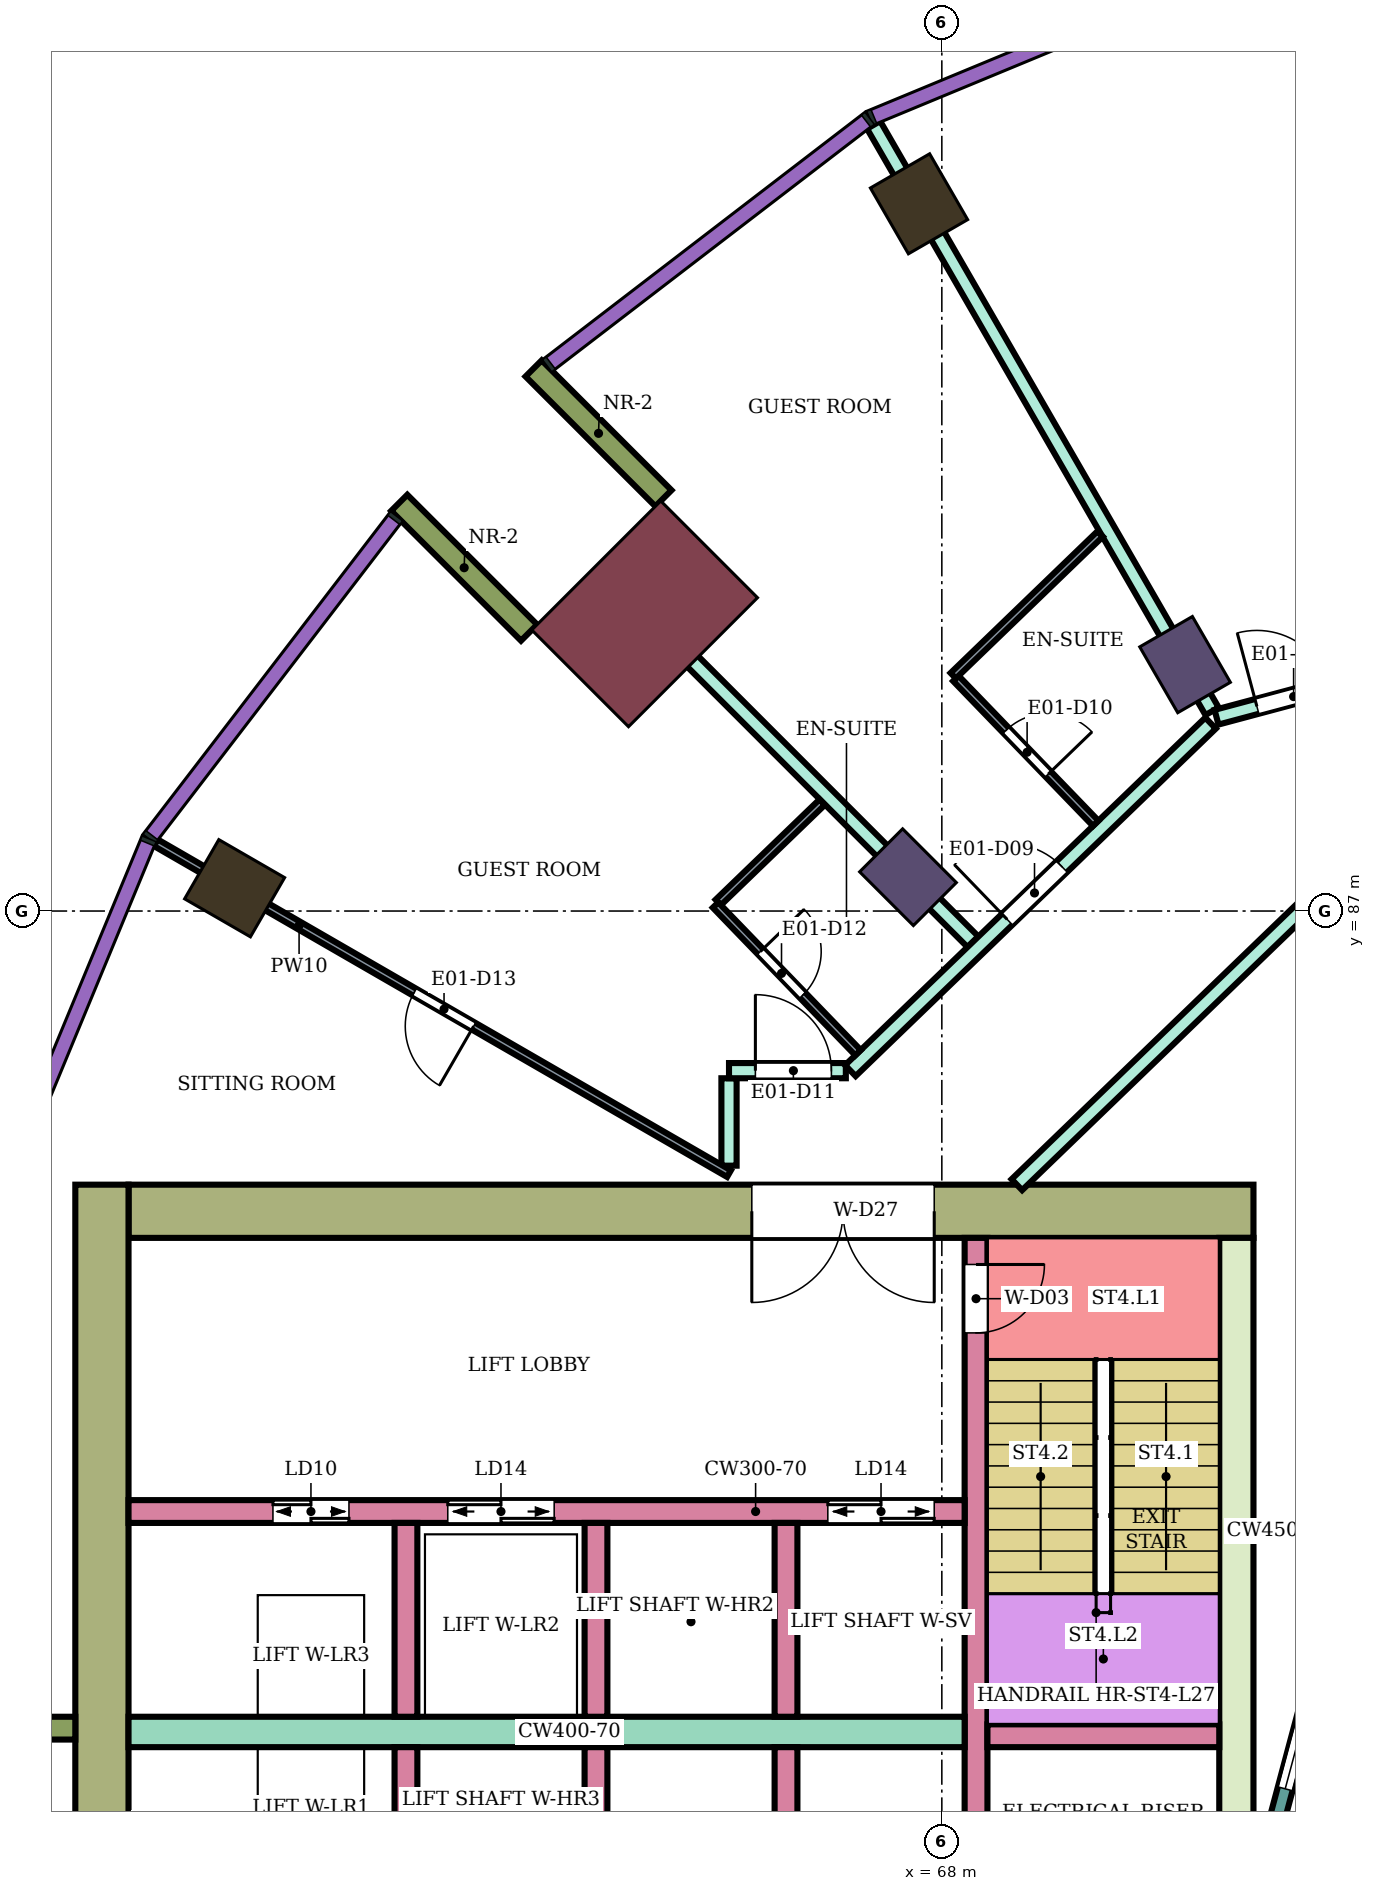
"""IFC4 building model, lengths in metres.
Left out: names, types, materials, properties, quantities, classifications, styles, units other than length and angle.
Written with IfcOpenShell. Run it as: python <this file> out.ifc"""

import sys

from ifc_helpers import new_model, si_unit, direction, frame, frame_2d, origin, origin_2d, place, context, subcontext, project, spatial, rectangle, extrude, element, fill, save


model = new_model("IFC4")
c1 = context("Model", 3, precision=1e-05, world=origin(), true_north=direction((0.0, 1.0)))
c2 = subcontext(c1, "Body", "Model", "MODEL_VIEW")
j1 = project(units=[si_unit("LENGTHUNIT", "METRE"), si_unit("PLANEANGLEUNIT", "RADIAN")], contexts=[c1])
p1 = place(None, origin())
s1 = spatial("IfcSite", under=j1, at=p1, CompositionType="ELEMENT")
p2 = place(p1, origin())
s2 = spatial("IfcBuilding", under=s1, at=p2, CompositionType="ELEMENT")
p3 = place(p2, frame((0.0, 0.0, 118.5)))
s3 = spatial("IfcBuildingStorey", under=s2, at=p3, CompositionType="ELEMENT", Elevation=118.5)
for number, where, z_axis, x_axis in (
    (1, (67.7, 96.304, 0.0), (0.0, 0.0, 1.0), (-0.5, 0.866, 0.0)),
    (2, (58.696, 87.3, 0.0), (0.0, 0.0, 1.0), (-0.866, 0.5, 0.0)),
):
    element("IfcColumn", number, at=place(p3, frame(where, z_axis=z_axis, x_axis=x_axis)), inside=s3, PredefinedType="COLUMN", context=c2, shape_type="SweptSolid", body=[
        extrude(rectangle(XDim=1.0, YDim=0.9, at=origin_2d()), origin(), (0.0, 0.0, 1.0), 3.9),
    ])
for number, where, z_axis, x_axis in (
    (3, (71.2, 90.242, 0.0), (0.0, 0.0, 1.0), (-0.5, 0.866, 0.0)),
    (4, (67.555, 87.445, 0.0), (0.0, 0.0, 1.0), (-0.707, 0.707, 0.0)),
):
    element("IfcColumn", number, at=place(p3, frame(where, z_axis=z_axis, x_axis=x_axis)), inside=s3, PredefinedType="COLUMN", context=c2, shape_type="SweptSolid", body=[
        extrude(rectangle(XDim=1.0, YDim=0.8, at=origin_2d()), origin(), (0.0, 0.0, 1.0), 3.9),
    ])
p4 = place(p3, frame((64.09, 90.91, 0.0), z_axis=(0.0, 0.0, 1.0), x_axis=(-0.707106781187, 0.707106781187, 0.0)))
e5 = element("IfcColumn", 5, at=p4, inside=s3, PredefinedType="COLUMN", context=c2, shape_type="SweptSolid", body=[
    extrude(rectangle(XDim=1.8, YDim=2.4, at=origin_2d()), origin(), (0.0, 0.0, 1.0), 3.9),
])
p5 = place(p3, frame((72.1, 83.05, 0.0), z_axis=(0.0, 0.0, 1.0), x_axis=(-1.0, 0.0, 0.0)))
e6 = element("IfcWall", 6, at=p5, inside=s3, PredefinedType="SHEAR", context=c2, shape_type="SweptSolid", body=[
    extrude(rectangle(XDim=14.8, YDim=0.7, at=frame_2d((7.4, 0.0))), origin(), (0.0, 0.0, 1.0), 3.58),
])
p6 = place(p5, frame((4.2, 0.0, 0.0)))
e7 = element("IfcOpeningElement", 7, at=p6, cuts=e6, PredefinedType="OPENING", context=c2, shape_type="SweptSolid", body=[
    extrude(rectangle(XDim=2.4, YDim=2.4, at=frame_2d((1.2, 1.2))), frame((0.0, 0.36, 0.0), z_axis=(0.0, -1.0, 0.0), x_axis=(1.0, 0.0, 0.0)), (0.0, 0.0, 1.0), 0.72),
])
p7 = place(p3, frame((71.875, 82.7, 0.0), z_axis=(0.0, 0.0, 1.0), x_axis=(0.0, -1.0, 0.0)))
e8 = element("IfcWall", 8, at=p7, inside=s3, PredefinedType="SHEAR", context=c2, shape_type="SweptSolid", body=[
    extrude(rectangle(XDim=7.7, YDim=0.45, at=frame_2d((3.85, 0.0))), origin(), (0.0, 0.0, 1.0), 3.58),
])
p8 = place(p3, frame((56.95, 83.4, 0.0), z_axis=(0.0, 0.0, 1.0), x_axis=(0.0, -1.0, 0.0)))
e9 = element("IfcWall", 9, at=p8, inside=s3, PredefinedType="SHEAR", context=c2, shape_type="SweptSolid", body=[
    extrude(rectangle(XDim=16.8, YDim=0.7, at=frame_2d((8.4, 0.0))), origin(), (0.0, 0.0, 1.0), 3.58),
])
p9 = place(p3, frame((68.45, 82.7, 0.0), z_axis=(0.0, 0.0, 1.0), x_axis=(0.0, -1.0, 0.0)))
e10 = element("IfcWall", 10, at=p9, inside=s3, PredefinedType="SHEAR", context=c2, shape_type="SweptSolid", body=[
    extrude(rectangle(XDim=7.7, YDim=0.3, at=frame_2d((3.85, 0.0))), origin(), (0.0, 0.0, 1.0), 3.58),
])
p10 = place(p9, frame((0.35, 0.0, 0.0)))
e11 = element("IfcOpeningElement", 11, at=p10, cuts=e10, PredefinedType="OPENING", context=c2, shape_type="SweptSolid", body=[
    extrude(rectangle(XDim=0.9, YDim=2.1, at=frame_2d((0.45, 1.05))), frame((0.0, 0.16, 0.0), z_axis=(0.0, -1.0, 0.0), x_axis=(1.0, 0.0, 0.0)), (0.0, 0.0, 1.0), 0.32),
])
p11 = place(p3, frame((71.65, 76.15, 0.0), z_axis=(0.0, 0.0, 1.0), x_axis=(-1.0, 0.0, 0.0)))
e12 = element("IfcWall", 12, at=p11, inside=s3, PredefinedType="SHEAR", context=c2, shape_type="SweptSolid", body=[
    extrude(rectangle(XDim=3.05, YDim=0.3, at=frame_2d((1.525, 0.0))), origin(), (0.0, 0.0, 1.0), 3.58),
])
p12 = place(p3, frame((68.3, 76.2, 0.0), z_axis=(0.0, 0.0, 1.0), x_axis=(-1.0, 0.0, 0.0)))
e13 = element("IfcWall", 13, at=p12, inside=s3, PredefinedType="SHEAR", context=c2, shape_type="SweptSolid", body=[
    extrude(rectangle(XDim=11.0, YDim=0.4, at=frame_2d((5.5, 0.0))), origin(), (0.0, 0.0, 1.0), 3.58),
])
p13 = place(p3, frame((68.3, 79.1, 0.0), z_axis=(0.0, 0.0, 1.0), x_axis=(-1.0, 0.0, 0.0)))
e14 = element("IfcWall", 14, at=p13, inside=s3, PredefinedType="SHEAR", context=c2, shape_type="SweptSolid", body=[
    extrude(rectangle(XDim=11.0, YDim=0.3, at=frame_2d((5.5, 0.0))), origin(), (0.0, 0.0, 1.0), 3.58),
])
p14 = place(p13, frame((0.4, 0.0, 0.0)))
e15 = element("IfcOpeningElement", 15, at=p14, cuts=e14, PredefinedType="OPENING", context=c2, shape_type="SweptSolid", body=[
    extrude(rectangle(XDim=1.4, YDim=2.1, at=frame_2d((0.7, 1.05))), frame((0.0, 0.16, 0.0), z_axis=(0.0, -1.0, 0.0), x_axis=(1.0, 0.0, 0.0)), (0.0, 0.0, 1.0), 0.32),
])
p15 = place(p13, frame((5.4, 0.0, 0.0)))
e16 = element("IfcOpeningElement", 16, at=p15, cuts=e14, PredefinedType="OPENING", context=c2, shape_type="SweptSolid", body=[
    extrude(rectangle(XDim=1.4, YDim=2.1, at=frame_2d((0.7, 1.05))), frame((0.0, 0.16, 0.0), z_axis=(0.0, -1.0, 0.0), x_axis=(1.0, 0.0, 0.0)), (0.0, 0.0, 1.0), 0.32),
])
p16 = place(p13, frame((8.1, 0.0, 0.0)))
e17 = element("IfcOpeningElement", 17, at=p16, cuts=e14, PredefinedType="OPENING", context=c2, shape_type="SweptSolid", body=[
    extrude(rectangle(XDim=1.0, YDim=2.1, at=frame_2d((0.5, 1.05))), frame((0.0, 0.16, 0.0), z_axis=(0.0, -1.0, 0.0), x_axis=(1.0, 0.0, 0.0)), (0.0, 0.0, 1.0), 0.32),
])
for number, where, z_axis, x_axis in (
    (18, (65.95, 76.0, 0.0), (0.0, 0.0, 1.0), (0.0, -1.0, 0.0)),
    (19, (63.45, 76.0, 0.0), (0.0, 0.0, 1.0), (0.0, -1.0, 0.0)),
    (20, (60.95, 76.0, 0.0), (0.0, 0.0, 1.0), (0.0, -1.0, 0.0)),
    (21, (65.95, 78.95, 0.0), (0.0, 0.0, 1.0), (0.0, -1.0, 0.0)),
    (22, (63.45, 78.95, 0.0), (0.0, 0.0, 1.0), (0.0, -1.0, 0.0)),
    (23, (60.95, 78.95, 0.0), (0.0, 0.0, 1.0), (0.0, -1.0, 0.0)),
):
    element("IfcWall", number, at=place(p3, frame(where, z_axis=z_axis, x_axis=x_axis)), inside=s3, PredefinedType="SHEAR", context=c2, shape_type="SweptSolid", body=[
        extrude(rectangle(XDim=2.55, YDim=0.3, at=frame_2d((1.275, 0.0))), origin(), (0.0, 0.0, 1.0), 3.58),
    ])
for number, where, z_axis, x_axis in (
    (24, (64.338, 92.43, 0.0), (0.0, 0.0, 1.0), (-0.707, 0.707, 0.0)),
    (25, (62.57, 90.662, 0.0), (0.0, 0.0, 1.0), (-0.707, 0.707, 0.0)),
    (26, (56.6, 76.25, 0.0), (0.0, 0.0, 1.0), (-1.0, 0.0, 0.0)),
):
    element("IfcWall", number, at=place(p3, frame(where, z_axis=z_axis, x_axis=x_axis)), inside=s3, PredefinedType="NOTDEFINED", context=c2, shape_type="SweptSolid", body=[
        extrude(rectangle(XDim=2.416, YDim=0.3, at=frame_2d((1.208, 0.0))), origin(), (0.0, 0.0, 1.0), 3.9),
    ])
p17 = place(p3, frame((73.415, 78.802, 0.0), z_axis=(0.0, 0.0, 1.0), x_axis=(-0.258789828301, -0.965933654434, 0.0)))
e27 = element("IfcWall", 27, at=p17, inside=s3, PredefinedType="NOTDEFINED", context=c2, shape_type="SweptSolid", body=[
    extrude(rectangle(XDim=3.936, YDim=0.2, at=frame_2d((1.968, 0.0))), origin(), (0.0, 0.0, 1.0), 3.9),
])
p18 = place(p17, frame((0.468, 0.0, 0.9)))
e28 = element("IfcOpeningElement", 28, at=p18, cuts=e27, PredefinedType="OPENING", context=c2, shape_type="SweptSolid", body=[
    extrude(rectangle(XDim=3.0, YDim=2.3, at=frame_2d((1.5, 1.15))), frame((0.0, 0.11, 0.0), z_axis=(0.0, -1.0, 0.0), x_axis=(1.0, 0.0, 0.0)), (0.0, 0.0, 1.0), 0.22),
])
p19 = place(p3, frame((63.598, 91.408, 0.0), z_axis=(0.0, 0.0, 1.0), x_axis=(0.706963264491, -0.707250268759, 0.0)))
e29 = element("IfcWall", 29, at=p19, inside=s3, PredefinedType="PARTITIONING", context=c2, shape_type="SweptSolid", body=[
    extrude(rectangle(XDim=6.805, YDim=0.2, at=frame_2d((3.403, 0.0))), origin(), (0.0, 0.0, 1.0), 3.45),
])
p20 = place(p3, frame((65.2, 83.65, 0.0), z_axis=(0.0, 0.0, 1.0), x_axis=(0.0, 1.0, 0.0)))
e30 = element("IfcWall", 30, at=p20, inside=s3, PredefinedType="PARTITIONING", context=c2, shape_type="SweptSolid", body=[
    extrude(rectangle(XDim=1.15, YDim=0.2, at=frame_2d((0.575, 0.0))), origin(), (0.0, 0.0, 1.0), 3.45),
])
p21 = place(p3, frame((65.2, 84.9, 0.0), z_axis=(0.0, 0.0, 1.0), x_axis=(1.0, 0.0, 0.0)))
e31 = element("IfcWall", 31, at=p21, inside=s3, PredefinedType="PARTITIONING", context=c2, shape_type="SweptSolid", body=[
    extrude(rectangle(XDim=1.537, YDim=0.2, at=frame_2d((0.769, 0.0))), origin(), (0.0, 0.0, 1.0), 3.45),
])
p22 = place(p21, frame((0.347, 0.0, 0.0)))
e32 = element("IfcOpeningElement", 32, at=p22, cuts=e31, PredefinedType="OPENING", context=c2, shape_type="SweptSolid", body=[
    extrude(rectangle(XDim=1.0, YDim=2.1, at=frame_2d((0.5, 1.05))), frame((0.0, 0.11, 0.0), z_axis=(0.0, -1.0, 0.0), x_axis=(1.0, 0.0, 0.0)), (0.0, 0.0, 1.0), 0.22),
])
p23 = place(p3, frame((66.797, 84.9, 0.0), z_axis=(0.0, 0.0, 1.0), x_axis=(0.719692092412, 0.694293376116, 0.0)))
e33 = element("IfcWall", 33, at=p23, inside=s3, PredefinedType="PARTITIONING", context=c2, shape_type="SweptSolid", body=[
    extrude(rectangle(XDim=6.584, YDim=0.2, at=frame_2d((3.292, 0.0))), origin(), (0.0, 0.0, 1.0), 3.45),
])
p24 = place(p23, frame((2.866, 0.0, 0.0)))
e34 = element("IfcOpeningElement", 34, at=p24, cuts=e33, PredefinedType="OPENING", context=c2, shape_type="SweptSolid", body=[
    extrude(rectangle(XDim=1.0, YDim=2.1, at=frame_2d((0.5, 1.05))), frame((0.0, 0.11, 0.0), z_axis=(0.0, -1.0, 0.0), x_axis=(1.0, 0.0, 0.0)), (0.0, 0.0, 1.0), 0.22),
])
p25 = place(p3, frame((67.102, 97.342, 0.0), z_axis=(0.0, 0.0, 1.0), x_axis=(0.499927298089, -0.866067374183, 0.0)))
e35 = element("IfcWall", 35, at=p25, inside=s3, PredefinedType="PARTITIONING", context=c2, shape_type="SweptSolid", body=[
    extrude(rectangle(XDim=8.907, YDim=0.2, at=frame_2d((4.454, 0.0))), origin(), (0.0, 0.0, 1.0), 3.45),
])
p26 = place(p3, frame((68.987, 83.4, 0.0), z_axis=(0.0, 0.0, 1.0), x_axis=(0.719586298962, 0.694403022997, 0.0)))
e36 = element("IfcWall", 36, at=p26, inside=s3, PredefinedType="PARTITIONING", context=c2, shape_type="SweptSolid", body=[
    extrude(rectangle(XDim=5.439, YDim=0.2, at=frame_2d((2.719, 0.0))), origin(), (0.0, 0.0, 1.0), 3.45),
])
p27 = place(p3, frame((71.614, 89.55, 0.0), z_axis=(0.0, 0.0, 1.0), x_axis=(0.965967958589, 0.258661753994, 0.0)))
e37 = element("IfcWall", 37, at=p27, inside=s3, PredefinedType="PARTITIONING", context=c2, shape_type="SweptSolid", body=[
    extrude(rectangle(XDim=8.592, YDim=0.2, at=frame_2d((4.296, 0.0))), origin(), (0.0, 0.0, 1.0), 3.45),
])
p28 = place(p27, frame((0.55, 0.0, 0.0)))
e38 = element("IfcOpeningElement", 38, at=p28, cuts=e37, PredefinedType="OPENING", context=c2, shape_type="SweptSolid", body=[
    extrude(rectangle(XDim=1.0, YDim=2.1, at=frame_2d((0.5, 1.05))), frame((0.0, 0.11, 0.0), z_axis=(0.0, -1.0, 0.0), x_axis=(1.0, 0.0, 0.0)), (0.0, 0.0, 1.0), 0.22),
])
p29 = place(p3, frame((57.659, 87.899, 0.0), z_axis=(0.0, 0.0, 1.0), x_axis=(0.86602264145, -0.500004784474, 0.0)))
e39 = element("IfcWall", 39, at=p29, inside=s3, PredefinedType="PARTITIONING", context=c2, shape_type="SweptSolid", body=[
    extrude(rectangle(XDim=8.708, YDim=0.1, at=frame_2d((4.354, 0.0))), origin(), (0.0, 0.0, 1.0), 3.45),
])
p30 = place(p29, frame((3.929, 0.0, 0.0)))
e40 = element("IfcOpeningElement", 40, at=p30, cuts=e39, PredefinedType="OPENING", context=c2, shape_type="SweptSolid", body=[
    extrude(rectangle(XDim=0.9, YDim=2.1, at=frame_2d((0.45, 1.05))), frame((0.0, 0.06, 0.0), z_axis=(0.0, -1.0, 0.0), x_axis=(1.0, 0.0, 0.0)), (0.0, 0.0, 1.0), 0.12),
])
p31 = place(p3, frame((65.059, 87.114, 0.0), z_axis=(0.0, 0.0, 1.0), x_axis=(0.719715847356, 0.694268751324, 0.0)))
e41 = element("IfcWall", 41, at=p31, inside=s3, PredefinedType="PARTITIONING", context=c2, shape_type="SweptSolid", body=[
    extrude(rectangle(XDim=1.9, YDim=0.1, at=frame_2d((0.95, 0.0))), origin(), (0.0, 0.0, 1.0), 3.45),
])
p32 = place(p3, frame((65.023, 87.079, 0.0), z_axis=(0.0, 0.0, 1.0), x_axis=(0.694287838235, -0.719697434815, 0.0)))
e42 = element("IfcWall", 42, at=p32, inside=s3, PredefinedType="PARTITIONING", context=c2, shape_type="SweptSolid", body=[
    extrude(rectangle(XDim=2.7, YDim=0.1, at=frame_2d((1.35, 0.0))), origin(), (0.0, 0.0, 1.0), 3.45),
])
p33 = place(p32, frame((0.85, 0.0, 0.0)))
e43 = element("IfcOpeningElement", 43, at=p33, cuts=e42, PredefinedType="OPENING", context=c2, shape_type="SweptSolid", body=[
    extrude(rectangle(XDim=0.8, YDim=2.1, at=frame_2d((0.4, 1.05))), frame((0.0, 0.06, 0.0), z_axis=(0.0, -1.0, 0.0), x_axis=(1.0, 0.0, 0.0)), (0.0, 0.0, 1.0), 0.12),
])
p34 = place(p3, frame((68.185, 90.06, 0.0), z_axis=(0.0, 0.0, 1.0), x_axis=(0.69446127412, -0.719530081892, 0.0)))
e44 = element("IfcWall", 44, at=p34, inside=s3, PredefinedType="PARTITIONING", context=c2, shape_type="SweptSolid", body=[
    extrude(rectangle(XDim=2.649, YDim=0.1, at=frame_2d((1.324, 0.0))), origin(), (0.0, 0.0, 1.0), 3.45),
])
p35 = place(p34, frame((0.95, 0.0, 0.0)))
e45 = element("IfcOpeningElement", 45, at=p35, cuts=e44, PredefinedType="OPENING", context=c2, shape_type="SweptSolid", body=[
    extrude(rectangle(XDim=0.8, YDim=2.1, at=frame_2d((0.4, 1.05))), frame((0.0, 0.06, 0.0), z_axis=(0.0, -1.0, 0.0), x_axis=(1.0, 0.0, 0.0)), (0.0, 0.0, 1.0), 0.12),
])
p36 = place(p3, frame((68.15, 90.096, 0.0), z_axis=(0.0, 0.0, 1.0), x_axis=(0.719667544954, 0.694318820672, 0.0)))
e46 = element("IfcWall", 46, at=p36, inside=s3, PredefinedType="PARTITIONING", context=c2, shape_type="SweptSolid", body=[
    extrude(rectangle(XDim=2.687, YDim=0.1, at=frame_2d((1.344, 0.0))), origin(), (0.0, 0.0, 1.0), 3.45),
])
p37 = place(p18, origin())
e47 = element("IfcWindow", 47, at=p37, inside=s3, PartitioningType="SINGLE_PANEL", PredefinedType="WINDOW", context=c2, shape_type="SweptSolid", body=[
    extrude(rectangle(XDim=3.0, YDim=2.3, at=frame_2d((1.5, 1.15))), frame((0.0, 0.03, 0.0), z_axis=(0.0, -1.0, 0.0), x_axis=(1.0, 0.0, 0.0)), (0.0, 0.0, 1.0), 0.06),
])
fill(e28, e47)
p38 = place(p28, origin())
e48 = element("IfcDoor", 48, at=p38, inside=s3, OperationType="SINGLE_SWING_LEFT", PredefinedType="DOOR", context=c2, shape_type="SweptSolid", body=[
    extrude(rectangle(XDim=1.0, YDim=2.1, at=frame_2d((0.5, 1.05))), frame((0.0, 0.025, 0.0), z_axis=(0.0, -1.0, 0.0), x_axis=(1.0, 0.0, 0.0)), (0.0, 0.0, 1.0), 0.05),
])
fill(e38, e48)
p39 = place(p24, origin())
e49 = element("IfcDoor", 49, at=p39, inside=s3, OperationType="SINGLE_SWING_LEFT", PredefinedType="DOOR", context=c2, shape_type="SweptSolid", body=[
    extrude(rectangle(XDim=1.0, YDim=2.1, at=frame_2d((0.5, 1.05))), frame((0.0, 0.025, 0.0), z_axis=(0.0, -1.0, 0.0), x_axis=(1.0, 0.0, 0.0)), (0.0, 0.0, 1.0), 0.05),
])
fill(e34, e49)
p40 = place(p35, origin())
e50 = element("IfcDoor", 50, at=p40, inside=s3, OperationType="SINGLE_SWING_RIGHT", PredefinedType="DOOR", context=c2, shape_type="SweptSolid", body=[
    extrude(rectangle(XDim=0.8, YDim=2.1, at=frame_2d((0.4, 1.05))), frame((0.0, 0.025, 0.0), z_axis=(0.0, -1.0, 0.0), x_axis=(1.0, 0.0, 0.0)), (0.0, 0.0, 1.0), 0.05),
])
fill(e45, e50)
p41 = place(p22, origin())
e51 = element("IfcDoor", 51, at=p41, inside=s3, OperationType="SINGLE_SWING_LEFT", PredefinedType="DOOR", context=c2, shape_type="SweptSolid", body=[
    extrude(rectangle(XDim=1.0, YDim=2.1, at=frame_2d((0.5, 1.05))), frame((0.0, 0.025, 0.0), z_axis=(0.0, -1.0, 0.0), x_axis=(1.0, 0.0, 0.0)), (0.0, 0.0, 1.0), 0.05),
])
fill(e32, e51)
p42 = place(p33, origin())
e52 = element("IfcDoor", 52, at=p42, inside=s3, OperationType="SINGLE_SWING_LEFT", PredefinedType="DOOR", context=c2, shape_type="SweptSolid", body=[
    extrude(rectangle(XDim=0.8, YDim=2.1, at=frame_2d((0.4, 1.05))), frame((0.0, 0.025, 0.0), z_axis=(0.0, -1.0, 0.0), x_axis=(1.0, 0.0, 0.0)), (0.0, 0.0, 1.0), 0.05),
])
fill(e43, e52)
p43 = place(p30, frame((0.9, 0.0, 0.0), z_axis=(0.0, 0.0, 1.0), x_axis=(-1.0, 0.0, 0.0)))
e53 = element("IfcDoor", 53, at=p43, inside=s3, OperationType="SINGLE_SWING_LEFT", PredefinedType="DOOR", context=c2, shape_type="SweptSolid", body=[
    extrude(rectangle(XDim=0.9, YDim=2.1, at=frame_2d((0.45, 1.05))), frame((0.0, 0.025, 0.0), z_axis=(0.0, -1.0, 0.0), x_axis=(1.0, 0.0, 0.0)), (0.0, 0.0, 1.0), 0.05),
])
fill(e40, e53)
p44 = place(p10, origin())
e54 = element("IfcDoor", 54, at=p44, inside=s3, OperationType="SINGLE_SWING_LEFT", PredefinedType="DOOR", context=c2, shape_type="SweptSolid", body=[
    extrude(rectangle(XDim=0.9, YDim=2.1, at=frame_2d((0.45, 1.05))), frame((0.0, 0.025, 0.0), z_axis=(0.0, -1.0, 0.0), x_axis=(1.0, 0.0, 0.0)), (0.0, 0.0, 1.0), 0.05),
])
fill(e11, e54)
p45 = place(p14, origin())
e55 = element("IfcDoor", 55, at=p45, inside=s3, OperationType="DOUBLE_DOOR_SLIDING", PredefinedType="DOOR", context=c2, shape_type="SweptSolid", body=[
    extrude(rectangle(XDim=1.4, YDim=2.1, at=frame_2d((0.7, 1.05))), frame((0.0, 0.025, 0.0), z_axis=(0.0, -1.0, 0.0), x_axis=(1.0, 0.0, 0.0)), (0.0, 0.0, 1.0), 0.05),
])
fill(e15, e55)
p46 = place(p15, origin())
e56 = element("IfcDoor", 56, at=p46, inside=s3, OperationType="DOUBLE_DOOR_SLIDING", PredefinedType="DOOR", context=c2, shape_type="SweptSolid", body=[
    extrude(rectangle(XDim=1.4, YDim=2.1, at=frame_2d((0.7, 1.05))), frame((0.0, 0.025, 0.0), z_axis=(0.0, -1.0, 0.0), x_axis=(1.0, 0.0, 0.0)), (0.0, 0.0, 1.0), 0.05),
])
fill(e16, e56)
p47 = place(p16, origin())
e57 = element("IfcDoor", 57, at=p47, inside=s3, OperationType="DOUBLE_DOOR_SLIDING", PredefinedType="DOOR", context=c2, shape_type="SweptSolid", body=[
    extrude(rectangle(XDim=1.0, YDim=2.1, at=frame_2d((0.5, 1.05))), frame((0.0, 0.025, 0.0), z_axis=(0.0, -1.0, 0.0), x_axis=(1.0, 0.0, 0.0)), (0.0, 0.0, 1.0), 0.05),
])
fill(e17, e57)
p48 = place(p6, origin())
e58 = element("IfcDoor", 58, at=p48, inside=s3, OperationType="DOUBLE_DOOR_SINGLE_SWING", PredefinedType="DOOR", context=c2, shape_type="SweptSolid", body=[
    extrude(rectangle(XDim=2.4, YDim=2.4, at=frame_2d((1.2, 1.2))), frame((0.0, 0.025, 0.0), z_axis=(0.0, -1.0, 0.0), x_axis=(1.0, 0.0, 0.0)), (0.0, 0.0, 1.0), 0.05),
])
fill(e7, e58)
save(model, sys.argv[1])
